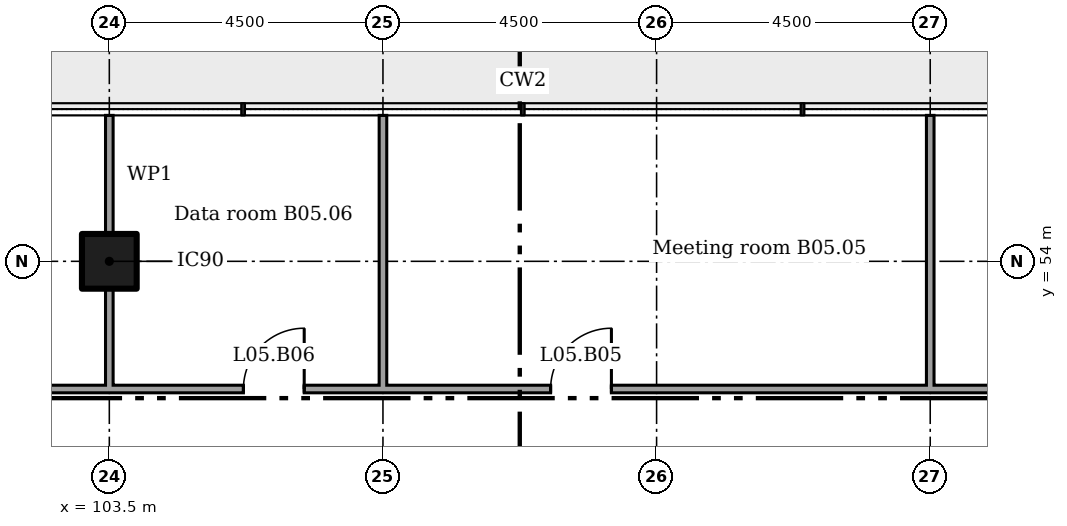
"""IFC4 building model, lengths in metres.
Left out: names, types, materials, properties, quantities, classifications, styles, units other than length and angle.
Written with IfcOpenShell. Run it as: python <this file> out.ifc"""

import sys

from ifc_helpers import new_model, si_unit, direction, frame, frame_2d, origin, origin_2d, place, context, subcontext, project, spatial, rectangle, extrude, element, fill, save


model = new_model("IFC4")
c1 = context("Model", 3, precision=1e-05, world=origin(), true_north=direction((0.0, 1.0)))
c2 = subcontext(c1, "Body", "Model", "MODEL_VIEW")
j1 = project(units=[si_unit("LENGTHUNIT", "METRE"), si_unit("PLANEANGLEUNIT", "RADIAN")], contexts=[c1])
p1 = place(None, origin())
s1 = spatial("IfcSite", under=j1, at=p1, CompositionType="ELEMENT")
p2 = place(p1, origin())
s2 = spatial("IfcBuilding", under=s1, at=p2, CompositionType="ELEMENT")
p3 = place(p2, frame((0.0, 0.0, 25.4)))
s3 = spatial("IfcBuildingStorey", under=s2, at=p3, CompositionType="ELEMENT", Elevation=25.4)
p4 = place(p3, frame((103.5, 54.0, 0.0)))
e1 = element("IfcColumn", 1, at=p4, inside=s3, PredefinedType="COLUMN", context=c2, shape_type="SweptSolid", body=[
    extrude(rectangle(XDim=0.9, YDim=0.9, at=origin_2d()), origin(), (0.0, 0.0, 1.0), 4.4),
])
p5 = place(p3, frame((101.038, 51.9, 0.0)))
e2 = element("IfcWall", 2, at=p5, inside=s3, PredefinedType="PARTITIONING", context=c2, shape_type="SweptSolid", body=[
    extrude(rectangle(XDim=19.025, YDim=0.125, at=frame_2d((9.512, 0.0))), origin(), (0.0, 0.0, 1.0), 4.225),
])
p6 = place(p5, frame((9.719, 0.0, 0.0)))
e3 = element("IfcOpeningElement", 3, at=p6, cuts=e2, PredefinedType="OPENING", context=c2, shape_type="SweptSolid", body=[
    extrude(rectangle(XDim=1.0, YDim=2.1, at=frame_2d((0.5, 1.05))), frame((0.0, 0.073, 0.0), z_axis=(0.0, -1.0, 0.0), x_axis=(1.0, 0.0, 0.0)), (0.0, 0.0, 1.0), 0.145),
])
p7 = place(p5, frame((4.667, 0.0, 0.0)))
e4 = element("IfcOpeningElement", 4, at=p7, cuts=e2, PredefinedType="OPENING", context=c2, shape_type="SweptSolid", body=[
    extrude(rectangle(XDim=1.0, YDim=2.1, at=frame_2d((0.5, 1.05))), frame((0.0, 0.073, 0.0), z_axis=(0.0, -1.0, 0.0), x_axis=(1.0, 0.0, 0.0)), (0.0, 0.0, 1.0), 0.145),
])
p8 = place(p3, frame((103.5, 51.9, 0.0), z_axis=(0.0, 0.0, 1.0), x_axis=(0.0, 1.0, 0.0)))
e5 = element("IfcWall", 5, at=p8, inside=s3, PredefinedType="PARTITIONING", context=c2, shape_type="SweptSolid", body=[
    extrude(rectangle(XDim=1.65, YDim=0.125, at=frame_2d((0.825, 0.0))), origin(), (0.0, 0.0, 1.0), 3.602),
])
p9 = place(p3, frame((103.5, 54.45, 0.0), z_axis=(0.0, 0.0, 1.0), x_axis=(0.0, 1.0, 0.0)))
e6 = element("IfcWall", 6, at=p9, inside=s3, PredefinedType="PARTITIONING", context=c2, shape_type="SweptSolid", body=[
    extrude(rectangle(XDim=1.95, YDim=0.125, at=frame_2d((0.975, 0.0))), origin(), (0.0, 0.0, 1.0), 3.602),
])
for number, where, z_axis, x_axis in (
    (7, (108.0, 51.9, 0.0), (0.0, 0.0, 1.0), (0.0, 1.0, 0.0)),
    (8, (117.0, 51.9, 0.0), (0.0, 0.0, 1.0), (0.0, 1.0, 0.0)),
):
    element("IfcWall", number, at=place(p3, frame(where, z_axis=z_axis, x_axis=x_axis)), inside=s3, PredefinedType="PARTITIONING", context=c2, shape_type="SweptSolid", body=[
        extrude(rectangle(XDim=4.5, YDim=0.125, at=frame_2d((2.25, 0.0))), origin(), (0.0, 0.0, 1.0), 3.613),
    ])
p10 = place(p6, origin())
e9 = element("IfcDoor", 9, at=p10, inside=s3, OperationType="SINGLE_SWING_LEFT", PredefinedType="DOOR", context=c2, shape_type="SweptSolid", body=[
    extrude(rectangle(XDim=1.0, YDim=2.1, at=frame_2d((0.5, 1.05))), frame((0.0, 0.025, 0.0), z_axis=(0.0, -1.0, 0.0), x_axis=(1.0, 0.0, 0.0)), (0.0, 0.0, 1.0), 0.05),
])
fill(e3, e9)
p11 = place(p7, origin())
e10 = element("IfcDoor", 10, at=p11, inside=s3, OperationType="SINGLE_SWING_LEFT", PredefinedType="DOOR", context=c2, shape_type="SweptSolid", body=[
    extrude(rectangle(XDim=1.0, YDim=2.1, at=frame_2d((0.5, 1.05))), frame((0.0, 0.025, 0.0), z_axis=(0.0, -1.0, 0.0), x_axis=(1.0, 0.0, 0.0)), (0.0, 0.0, 1.0), 0.05),
])
fill(e4, e10)
save(model, sys.argv[1])
